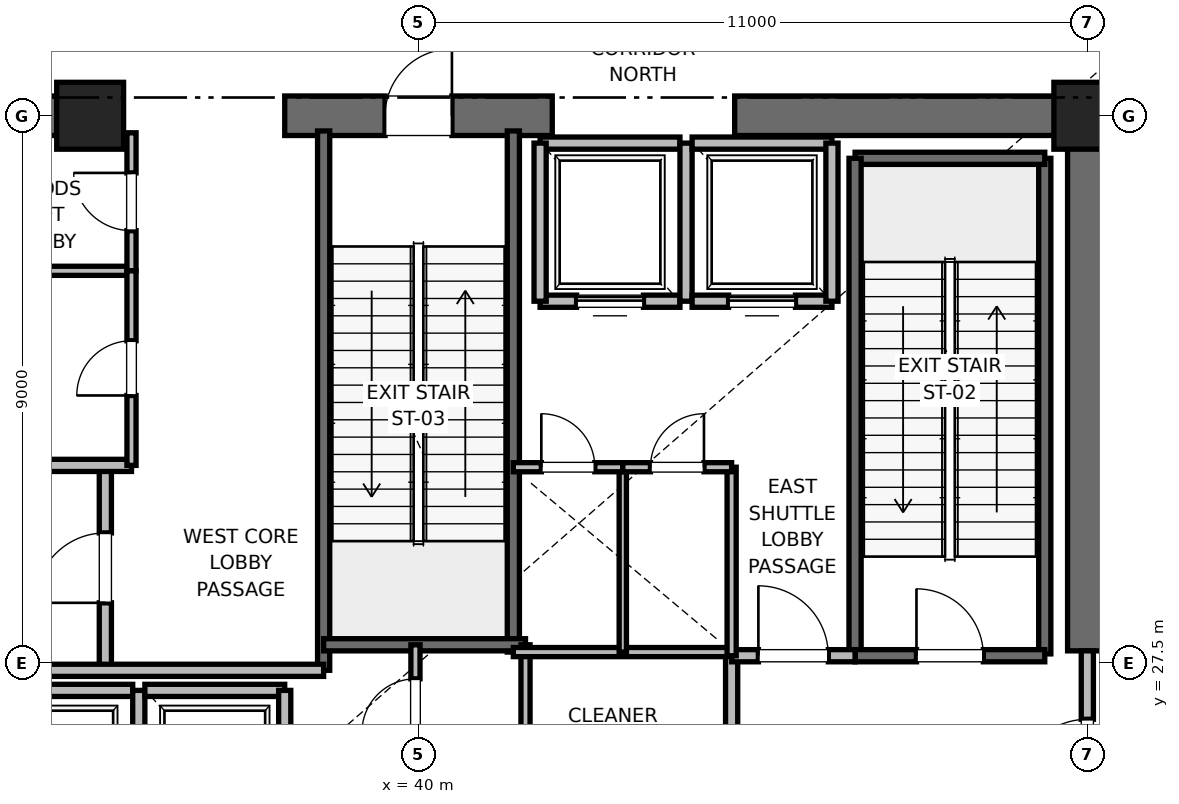
"""IFC4 building model, lengths in metres.
Left out: names, types, materials, properties, quantities, classifications, styles, units other than length and angle.
Written with IfcOpenShell. Run it as: python <this file> out.ifc"""

import sys

from ifc_helpers import new_model, si_unit, direction, frame, frame_2d, origin, origin_2d, place, context, subcontext, project, spatial, rectangle, extrude, element, fill, save


model = new_model("IFC4")
c1 = context("Model", 3, precision=1e-05, world=origin(), true_north=direction((0.0, 1.0)))
c2 = subcontext(c1, "Body", "Model", "MODEL_VIEW")
j1 = project(units=[si_unit("LENGTHUNIT", "METRE"), si_unit("PLANEANGLEUNIT", "RADIAN")], contexts=[c1])
p1 = place(None, origin())
s1 = spatial("IfcSite", under=j1, at=p1, CompositionType="ELEMENT")
p2 = place(p1, origin())
s2 = spatial("IfcBuilding", under=s1, at=p2, CompositionType="ELEMENT")
p3 = place(p2, frame((0.0, 0.0, 21.6)))
s3 = spatial("IfcBuildingStorey", under=s2, at=p3, CompositionType="ELEMENT", Elevation=21.6)
for number, where, z_axis, x_axis in (
    (1, (51.0, 36.5, 0.0), (0.0, 0.0, 1.0), (1.0, 0.0, 0.0)),
    (2, (34.6, 36.5, 0.0), (0.0, 0.0, 1.0), (1.0, 0.0, 0.0)),
):
    element("IfcColumn", number, at=place(p3, frame(where, z_axis=z_axis, x_axis=x_axis)), inside=s3, PredefinedType="PILASTER", context=c2, shape_type="SweptSolid", body=[
        extrude(rectangle(XDim=1.1, YDim=1.1, at=origin_2d()), origin(), (0.0, 0.0, 1.0), 6.0),
    ])
p4 = place(p3, frame((29.0, 36.5, 0.0), z_axis=(0.0, 0.0, 1.0), x_axis=(1.0, 0.0, 0.0)))
e3 = element("IfcWall", 3, at=p4, inside=s3, PredefinedType="SHEAR", context=c2, shape_type="SweptSolid", body=[
    extrude(rectangle(XDim=5.8, YDim=0.65, at=frame_2d((2.9, 0.0))), origin(), (0.0, 0.0, 1.0), 5.76),
])
p5 = place(p3, frame((37.8, 36.5, 0.0), z_axis=(0.0, 0.0, 1.0), x_axis=(1.0, 0.0, 0.0)))
e4 = element("IfcWall", 4, at=p5, inside=s3, PredefinedType="SHEAR", context=c2, shape_type="SweptSolid", body=[
    extrude(rectangle(XDim=4.4, YDim=0.65, at=frame_2d((2.2, 0.0))), origin(), (0.0, 0.0, 1.0), 5.76),
])
p6 = place(p5, frame((1.65, 0.0, 0.0)))
e5 = element("IfcOpeningElement", 5, at=p6, cuts=e4, PredefinedType="OPENING", context=c2, shape_type="SweptSolid", body=[
    extrude(rectangle(XDim=1.1, YDim=2.15, at=frame_2d((0.55, 1.075))), frame((0.0, 0.325, 0.0), z_axis=(0.0, -1.0, 0.0), x_axis=(1.0, 0.0, 0.0)), (0.0, 0.0, 1.0), 0.65),
])
p7 = place(p3, frame((45.2, 36.5, 0.0), z_axis=(0.0, 0.0, 1.0), x_axis=(1.0, 0.0, 0.0)))
e6 = element("IfcWall", 6, at=p7, inside=s3, PredefinedType="SHEAR", context=c2, shape_type="SweptSolid", body=[
    extrude(rectangle(XDim=5.8, YDim=0.65, at=frame_2d((2.9, 0.0))), origin(), (0.0, 0.0, 1.0), 5.76),
])
p8 = place(p3, frame((51.0, 27.7, 0.0), z_axis=(0.0, 0.0, 1.0), x_axis=(0.0, 1.0, 0.0)))
e7 = element("IfcWall", 7, at=p8, inside=s3, PredefinedType="SHEAR", context=c2, shape_type="SweptSolid", body=[
    extrude(rectangle(XDim=8.8, YDim=0.65, at=frame_2d((4.4, 0.0))), origin(), (0.0, 0.0, 1.0), 5.76),
])
p9 = place(p3, frame((50.3, 27.65, 0.0), z_axis=(0.0, 0.0, 1.0), x_axis=(0.0, 1.0, 0.0)))
e8 = element("IfcWall", 8, at=p9, inside=s3, PredefinedType="SOLIDWALL", context=c2, shape_type="SweptSolid", body=[
    extrude(rectangle(XDim=8.15, YDim=0.2, at=frame_2d((4.075, 0.0))), origin(), (0.0, 0.0, 1.0), 5.76),
])
p10 = place(p3, frame((47.18, 35.8, 0.0), z_axis=(0.0, 0.0, 1.0), x_axis=(1.0, 0.0, 0.0)))
e9 = element("IfcWall", 9, at=p10, inside=s3, PredefinedType="SOLIDWALL", context=c2, shape_type="SweptSolid", body=[
    extrude(rectangle(XDim=3.12, YDim=0.2, at=frame_2d((1.56, 0.0))), origin(), (0.0, 0.0, 1.0), 5.76),
])
p11 = place(p3, frame((47.18, 27.62, 0.0), z_axis=(0.0, 0.0, 1.0), x_axis=(0.0, 1.0, 0.0)))
e10 = element("IfcWall", 10, at=p11, inside=s3, PredefinedType="SOLIDWALL", context=c2, shape_type="SweptSolid", body=[
    extrude(rectangle(XDim=8.18, YDim=0.2, at=frame_2d((4.09, 0.0))), origin(), (0.0, 0.0, 1.0), 5.76),
])
p12 = place(p3, frame((47.18, 27.62, 0.0), z_axis=(0.0, 0.0, 1.0), x_axis=(1.0, 0.0, 0.0)))
e11 = element("IfcWall", 11, at=p12, inside=s3, PredefinedType="SOLIDWALL", context=c2, shape_type="SweptSolid", body=[
    extrude(rectangle(XDim=3.12, YDim=0.2, at=frame_2d((1.56, 0.0))), origin(), (0.0, 0.0, 1.0), 5.76),
])
p13 = place(p12, frame((1.01, 0.0, 0.0)))
e12 = element("IfcOpeningElement", 12, at=p13, cuts=e11, PredefinedType="OPENING", context=c2, shape_type="SweptSolid", body=[
    extrude(rectangle(XDim=1.1, YDim=2.15, at=frame_2d((0.55, 1.075))), frame((0.0, 0.1, 0.0), z_axis=(0.0, -1.0, 0.0), x_axis=(1.0, 0.0, 0.0)), (0.0, 0.0, 1.0), 0.2),
])
p14 = place(p3, frame((38.44, 27.38, 0.0), z_axis=(0.0, 0.0, 1.0), x_axis=(0.0, 1.0, 0.0)))
e13 = element("IfcWall", 13, at=p14, inside=s3, PredefinedType="SOLIDWALL", context=c2, shape_type="SweptSolid", body=[
    extrude(rectangle(XDim=8.87, YDim=0.2, at=frame_2d((4.435, 0.0))), origin(), (0.0, 0.0, 1.0), 5.76),
])
p15 = place(p3, frame((41.56, 27.68, 0.0), z_axis=(0.0, 0.0, 1.0), x_axis=(0.0, 1.0, 0.0)))
e14 = element("IfcWall", 14, at=p15, inside=s3, PredefinedType="SOLIDWALL", context=c2, shape_type="SweptSolid", body=[
    extrude(rectangle(XDim=8.57, YDim=0.2, at=frame_2d((4.285, 0.0))), origin(), (0.0, 0.0, 1.0), 5.76),
])
p16 = place(p3, frame((38.44, 27.8, 0.0), z_axis=(0.0, 0.0, 1.0), x_axis=(1.0, 0.0, 0.0)))
e15 = element("IfcWall", 15, at=p16, inside=s3, PredefinedType="SOLIDWALL", context=c2, shape_type="SweptSolid", body=[
    extrude(rectangle(XDim=3.32, YDim=0.2, at=frame_2d((1.66, 0.0))), origin(), (0.0, 0.0, 1.0), 5.76),
])
p17 = place(p3, frame((34.85, 27.38, 0.0), z_axis=(0.0, 0.0, 1.0), x_axis=(0.0, 1.0, 0.0)))
e16 = element("IfcWall", 16, at=p17, inside=s3, PredefinedType="PARTITIONING", context=c2, shape_type="SweptSolid", body=[
    extrude(rectangle(XDim=3.37, YDim=0.2, at=frame_2d((1.685, 0.0))), origin(), (0.0, 0.0, 1.0), 5.76),
])
p18 = place(p17, frame((1.11, 0.0, 0.0)))
e17 = element("IfcOpeningElement", 17, at=p18, cuts=e16, PredefinedType="OPENING", context=c2, shape_type="SweptSolid", body=[
    extrude(rectangle(XDim=1.15, YDim=2.2, at=frame_2d((0.575, 1.1))), frame((0.0, 0.1, 0.0), z_axis=(0.0, -1.0, 0.0), x_axis=(1.0, 0.0, 0.0)), (0.0, 0.0, 1.0), 0.2),
])
p19 = place(p3, frame((32.82, 27.38, 0.0), z_axis=(0.0, 0.0, 1.0), x_axis=(1.0, 0.0, 0.0)))
e18 = element("IfcWall", 18, at=p19, inside=s3, PredefinedType="PARTITIONING", context=c2, shape_type="SweptSolid", body=[
    extrude(rectangle(XDim=5.62, YDim=0.2, at=frame_2d((2.81, 0.0))), origin(), (0.0, 0.0, 1.0), 5.76),
])
p20 = place(p3, frame((32.15, 30.75, 0.0), z_axis=(0.0, 0.0, 1.0), x_axis=(1.0, 0.0, 0.0)))
e19 = element("IfcWall", 19, at=p20, inside=s3, PredefinedType="PARTITIONING", context=c2, shape_type="SweptSolid", body=[
    extrude(rectangle(XDim=3.13, YDim=0.2, at=frame_2d((1.565, 0.0))), origin(), (0.0, 0.0, 1.0), 5.76),
])
p21 = place(p3, frame((45.15, 24.25, 0.0), z_axis=(0.0, 0.0, 1.0), x_axis=(0.0, 1.0, 0.0)))
e20 = element("IfcWall", 20, at=p21, inside=s3, PredefinedType="PARTITIONING", context=c2, shape_type="SweptSolid", body=[
    extrude(rectangle(XDim=3.37, YDim=0.2, at=frame_2d((1.685, 0.0))), origin(), (0.0, 0.0, 1.0), 5.76),
])
p22 = place(p3, frame((45.15, 27.62, 0.0), z_axis=(0.0, 0.0, 1.0), x_axis=(1.0, 0.0, 0.0)))
e21 = element("IfcWall", 21, at=p22, inside=s3, PredefinedType="PARTITIONING", context=c2, shape_type="SweptSolid", body=[
    extrude(rectangle(XDim=2.03, YDim=0.2, at=frame_2d((1.015, 0.0))), origin(), (0.0, 0.0, 1.0), 5.76),
])
p23 = place(p22, frame((0.44, 0.0, 0.0)))
e22 = element("IfcOpeningElement", 22, at=p23, cuts=e21, PredefinedType="OPENING", context=c2, shape_type="SweptSolid", body=[
    extrude(rectangle(XDim=1.15, YDim=2.2, at=frame_2d((0.575, 1.1))), frame((0.0, 0.1, 0.0), z_axis=(0.0, -1.0, 0.0), x_axis=(1.0, 0.0, 0.0)), (0.0, 0.0, 1.0), 0.2),
])
p24 = place(p3, frame((51.0, 24.3, 0.0), z_axis=(0.0, 0.0, 1.0), x_axis=(0.0, 1.0, 0.0)))
e23 = element("IfcWall", 23, at=p24, inside=s3, PredefinedType="PARTITIONING", context=c2, shape_type="SweptSolid", body=[
    extrude(rectangle(XDim=3.4, YDim=0.2, at=frame_2d((1.7, 0.0))), origin(), (0.0, 0.0, 1.0), 4.54),
])
p25 = place(p24, frame((1.125, 0.0, 0.0)))
e24 = element("IfcOpeningElement", 24, at=p25, cuts=e23, PredefinedType="OPENING", context=c2, shape_type="SweptSolid", body=[
    extrude(rectangle(XDim=1.15, YDim=2.2, at=frame_2d((0.575, 1.1))), frame((0.0, 0.1, 0.0), z_axis=(0.0, -1.0, 0.0), x_axis=(1.0, 0.0, 0.0)), (0.0, 0.0, 1.0), 0.2),
])
p26 = place(p3, frame((35.3, 27.05, 0.0), z_axis=(0.0, 0.0, 1.0), x_axis=(-1.0, 0.0, 0.0)))
e25 = element("IfcWall", 25, at=p26, inside=s3, PredefinedType="SOLIDWALL", context=c2, shape_type="SweptSolid", body=[
    extrude(rectangle(XDim=2.3, YDim=0.2, at=frame_2d((1.15, 0.0))), origin(), (0.0, 0.0, 1.0), 5.76),
])
p27 = place(p3, frame((35.4, 24.45, 0.0), z_axis=(0.0, 0.0, 1.0), x_axis=(0.0, 1.0, 0.0)))
e26 = element("IfcWall", 26, at=p27, inside=s3, PredefinedType="SOLIDWALL", context=c2, shape_type="SweptSolid", body=[
    extrude(rectangle(XDim=2.6, YDim=0.2, at=frame_2d((1.3, 0.0))), origin(), (0.0, 0.0, 1.0), 5.76),
])
p28 = place(p3, frame((37.8, 27.05, 0.0), z_axis=(0.0, 0.0, 1.0), x_axis=(-1.0, 0.0, 0.0)))
e27 = element("IfcWall", 27, at=p28, inside=s3, PredefinedType="SOLIDWALL", context=c2, shape_type="SweptSolid", body=[
    extrude(rectangle(XDim=2.3, YDim=0.2, at=frame_2d((1.15, 0.0))), origin(), (0.0, 0.0, 1.0), 5.76),
])
p29 = place(p3, frame((37.8, 24.45, 0.0), z_axis=(0.0, 0.0, 1.0), x_axis=(0.0, 1.0, 0.0)))
e28 = element("IfcWall", 28, at=p29, inside=s3, PredefinedType="SOLIDWALL", context=c2, shape_type="SweptSolid", body=[
    extrude(rectangle(XDim=2.6, YDim=0.2, at=frame_2d((1.3, 0.0))), origin(), (0.0, 0.0, 1.0), 5.76),
])
p30 = place(p3, frame((42.0, 33.45, 0.0), z_axis=(0.0, 0.0, 1.0), x_axis=(1.0, 0.0, 0.0)))
e29 = element("IfcWall", 29, at=p30, inside=s3, PredefinedType="SOLIDWALL", context=c2, shape_type="SweptSolid", body=[
    extrude(rectangle(XDim=2.3, YDim=0.2, at=frame_2d((1.15, 0.0))), origin(), (0.0, 0.0, 1.0), 5.76),
])
p31 = place(p30, frame((0.6, 0.0, 0.0)))
e30 = element("IfcOpeningElement", 30, at=p31, cuts=e29, PredefinedType="OPENING", context=c2, shape_type="SweptSolid", body=[
    extrude(rectangle(XDim=1.1, YDim=2.2, at=frame_2d((0.55, 1.1))), frame((0.0, 0.1, 0.0), z_axis=(0.0, -1.0, 0.0), x_axis=(1.0, 0.0, 0.0)), (0.0, 0.0, 1.0), 0.2),
])
p32 = place(p3, frame((44.3, 36.05, 0.0), z_axis=(0.0, 0.0, 1.0), x_axis=(-1.0, 0.0, 0.0)))
e31 = element("IfcWall", 31, at=p32, inside=s3, PredefinedType="SOLIDWALL", context=c2, shape_type="SweptSolid", body=[
    extrude(rectangle(XDim=2.3, YDim=0.2, at=frame_2d((1.15, 0.0))), origin(), (0.0, 0.0, 1.0), 4.54),
])
for number, where, z_axis, x_axis in (
    (32, (42.0, 36.05, 0.0), (0.0, 0.0, 1.0), (0.0, -1.0, 0.0)),
    (33, (44.4, 33.45, 0.0), (0.0, 0.0, 1.0), (0.0, 1.0, 0.0)),
):
    element("IfcWall", number, at=place(p3, frame(where, z_axis=z_axis, x_axis=x_axis)), inside=s3, PredefinedType="SOLIDWALL", context=c2, shape_type="SweptSolid", body=[
        extrude(rectangle(XDim=2.6, YDim=0.2, at=frame_2d((1.3, 0.0))), origin(), (0.0, 0.0, 1.0), 4.54),
    ])
p33 = place(p3, frame((44.5, 33.45, 0.0), z_axis=(0.0, 0.0, 1.0), x_axis=(1.0, 0.0, 0.0)))
e34 = element("IfcWall", 34, at=p33, inside=s3, PredefinedType="SOLIDWALL", context=c2, shape_type="SweptSolid", body=[
    extrude(rectangle(XDim=2.3, YDim=0.2, at=frame_2d((1.15, 0.0))), origin(), (0.0, 0.0, 1.0), 5.76),
])
p34 = place(p33, frame((0.6, 0.0, 0.0)))
e35 = element("IfcOpeningElement", 35, at=p34, cuts=e34, PredefinedType="OPENING", context=c2, shape_type="SweptSolid", body=[
    extrude(rectangle(XDim=1.1, YDim=2.2, at=frame_2d((0.55, 1.1))), frame((0.0, 0.1, 0.0), z_axis=(0.0, -1.0, 0.0), x_axis=(1.0, 0.0, 0.0)), (0.0, 0.0, 1.0), 0.2),
])
p35 = place(p3, frame((46.8, 36.05, 0.0), z_axis=(0.0, 0.0, 1.0), x_axis=(-1.0, 0.0, 0.0)))
e36 = element("IfcWall", 36, at=p35, inside=s3, PredefinedType="SOLIDWALL", context=c2, shape_type="SweptSolid", body=[
    extrude(rectangle(XDim=2.3, YDim=0.2, at=frame_2d((1.15, 0.0))), origin(), (0.0, 0.0, 1.0), 4.54),
])
p36 = place(p3, frame((46.8, 33.45, 0.0), z_axis=(0.0, 0.0, 1.0), x_axis=(0.0, 1.0, 0.0)))
e37 = element("IfcWall", 37, at=p36, inside=s3, PredefinedType="SOLIDWALL", context=c2, shape_type="SweptSolid", body=[
    extrude(rectangle(XDim=2.6, YDim=0.2, at=frame_2d((1.3, 0.0))), origin(), (0.0, 0.0, 1.0), 5.76),
])
p37 = place(p3, frame((41.76, 23.8, 0.0), z_axis=(0.0, 0.0, 1.0), x_axis=(0.0, 1.0, 0.0)))
e38 = element("IfcWall", 38, at=p37, inside=s3, PredefinedType="PARTITIONING", context=c2, shape_type="SweptSolid", body=[
    extrude(rectangle(XDim=4.0, YDim=0.15, at=frame_2d((2.0, 0.0))), origin(), (0.0, 0.0, 1.0), 2.85),
])
p38 = place(p3, frame((39.95, 25.8, 0.0), z_axis=(0.0, 0.0, 1.0), x_axis=(0.0, 1.0, 0.0)))
e39 = element("IfcWall", 39, at=p38, inside=s3, PredefinedType="PARTITIONING", context=c2, shape_type="SweptSolid", body=[
    extrude(rectangle(XDim=2.0, YDim=0.15, at=frame_2d((1.0, 0.0))), origin(), (0.0, 0.0, 1.0), 2.85),
])
p39 = place(p38, frame((0.56, 0.0, 0.0)))
e40 = element("IfcOpeningElement", 40, at=p39, cuts=e39, PredefinedType="OPENING", context=c2, shape_type="SweptSolid", body=[
    extrude(rectangle(XDim=0.88, YDim=2.1, at=frame_2d((0.44, 1.05))), frame((0.0, 0.075, 0.0), z_axis=(0.0, -1.0, 0.0), x_axis=(1.0, 0.0, 0.0)), (0.0, 0.0, 1.0), 0.15),
])
p40 = place(p3, frame((32.15, 33.95, 0.0), z_axis=(0.0, 0.0, 1.0), x_axis=(1.0, 0.0, 0.0)))
e41 = element("IfcWall", 41, at=p40, inside=s3, PredefinedType="PARTITIONING", context=c2, shape_type="SweptSolid", body=[
    extrude(rectangle(XDim=3.13, YDim=0.15, at=frame_2d((1.565, 0.0))), origin(), (0.0, 0.0, 1.0), 2.85),
])
p41 = place(p3, frame((35.28, 33.95, 0.0), z_axis=(0.0, 0.0, 1.0), x_axis=(0.0, 1.0, 0.0)))
e42 = element("IfcWall", 42, at=p41, inside=s3, PredefinedType="PARTITIONING", context=c2, shape_type="SweptSolid", body=[
    extrude(rectangle(XDim=2.27, YDim=0.15, at=frame_2d((1.135, 0.0))), origin(), (0.0, 0.0, 1.0), 2.85),
])
p42 = place(p41, frame((0.66, 0.0, 0.0)))
e43 = element("IfcOpeningElement", 43, at=p42, cuts=e42, PredefinedType="OPENING", context=c2, shape_type="SweptSolid", body=[
    extrude(rectangle(XDim=0.95, YDim=2.15, at=frame_2d((0.475, 1.075))), frame((0.0, 0.075, 0.0), z_axis=(0.0, -1.0, 0.0), x_axis=(1.0, 0.0, 0.0)), (0.0, 0.0, 1.0), 0.15),
])
p43 = place(p3, frame((35.28, 30.75, 0.0), z_axis=(0.0, 0.0, 1.0), x_axis=(0.0, 1.0, 0.0)))
e44 = element("IfcWall", 44, at=p43, inside=s3, PredefinedType="PARTITIONING", context=c2, shape_type="SweptSolid", body=[
    extrude(rectangle(XDim=3.2, YDim=0.15, at=frame_2d((1.6, 0.0))), origin(), (0.0, 0.0, 1.0), 2.85),
])
p44 = place(p43, frame((1.15, 0.0, 0.0)))
e45 = element("IfcOpeningElement", 45, at=p44, cuts=e44, PredefinedType="OPENING", context=c2, shape_type="SweptSolid", body=[
    extrude(rectangle(XDim=0.9, YDim=2.1, at=frame_2d((0.45, 1.05))), frame((0.0, 0.075, 0.0), z_axis=(0.0, -1.0, 0.0), x_axis=(1.0, 0.0, 0.0)), (0.0, 0.0, 1.0), 0.15),
])
p45 = place(p3, frame((41.56, 27.68, 0.0), z_axis=(0.0, 0.0, 1.0), x_axis=(1.0, 0.0, 0.0)))
e46 = element("IfcWall", 46, at=p45, inside=s3, PredefinedType="PARTITIONING", context=c2, shape_type="SweptSolid", body=[
    extrude(rectangle(XDim=3.59, YDim=0.15, at=frame_2d((1.795, 0.0))), origin(), (0.0, 0.0, 1.0), 2.85),
])
p46 = place(p3, frame((45.15, 27.62, 0.0), z_axis=(0.0, 0.0, 1.0), x_axis=(0.0, 1.0, 0.0)))
e47 = element("IfcWall", 47, at=p46, inside=s3, PredefinedType="PARTITIONING", context=c2, shape_type="SweptSolid", body=[
    extrude(rectangle(XDim=3.1, YDim=0.15, at=frame_2d((1.55, 0.0))), origin(), (0.0, 0.0, 1.0), 2.85),
])
p47 = place(p3, frame((43.36, 27.68, 0.0), z_axis=(0.0, 0.0, 1.0), x_axis=(0.0, 1.0, 0.0)))
e48 = element("IfcWall", 48, at=p47, inside=s3, PredefinedType="PARTITIONING", context=c2, shape_type="SweptSolid", body=[
    extrude(rectangle(XDim=3.04, YDim=0.12, at=frame_2d((1.52, 0.0))), origin(), (0.0, 0.0, 1.0), 2.85),
])
p48 = place(p3, frame((41.56, 30.72, 0.0), z_axis=(0.0, 0.0, 1.0), x_axis=(1.0, 0.0, 0.0)))
e49 = element("IfcWall", 49, at=p48, inside=s3, PredefinedType="PARTITIONING", context=c2, shape_type="SweptSolid", body=[
    extrude(rectangle(XDim=1.8, YDim=0.15, at=frame_2d((0.9, 0.0))), origin(), (0.0, 0.0, 1.0), 2.85),
])
p49 = place(p48, frame((0.46, 0.0, 0.0)))
e50 = element("IfcOpeningElement", 50, at=p49, cuts=e49, PredefinedType="OPENING", context=c2, shape_type="SweptSolid", body=[
    extrude(rectangle(XDim=0.88, YDim=2.1, at=frame_2d((0.44, 1.05))), frame((0.0, 0.075, 0.0), z_axis=(0.0, -1.0, 0.0), x_axis=(1.0, 0.0, 0.0)), (0.0, 0.0, 1.0), 0.15),
])
p50 = place(p3, frame((43.36, 30.72, 0.0), z_axis=(0.0, 0.0, 1.0), x_axis=(1.0, 0.0, 0.0)))
e51 = element("IfcWall", 51, at=p50, inside=s3, PredefinedType="PARTITIONING", context=c2, shape_type="SweptSolid", body=[
    extrude(rectangle(XDim=1.79, YDim=0.15, at=frame_2d((0.895, 0.0))), origin(), (0.0, 0.0, 1.0), 2.85),
])
p51 = place(p50, frame((0.455, 0.0, 0.0)))
e52 = element("IfcOpeningElement", 52, at=p51, cuts=e51, PredefinedType="OPENING", context=c2, shape_type="SweptSolid", body=[
    extrude(rectangle(XDim=0.88, YDim=2.1, at=frame_2d((0.44, 1.05))), frame((0.0, 0.075, 0.0), z_axis=(0.0, -1.0, 0.0), x_axis=(1.0, 0.0, 0.0)), (0.0, 0.0, 1.0), 0.15),
])
p52 = place(p13, origin())
e53 = element("IfcDoor", 53, at=p52, inside=s3, OperationType="SINGLE_SWING_LEFT", PredefinedType="DOOR", context=c2, shape_type="SweptSolid", body=[
    extrude(rectangle(XDim=1.1, YDim=2.15, at=frame_2d((0.55, 1.075))), frame((0.0, 0.025, 0.0), z_axis=(0.0, -1.0, 0.0), x_axis=(1.0, 0.0, 0.0)), (0.0, 0.0, 1.0), 0.05),
])
fill(e12, e53)
p53 = place(p6, origin())
e54 = element("IfcDoor", 54, at=p53, inside=s3, OperationType="SINGLE_SWING_RIGHT", PredefinedType="DOOR", context=c2, shape_type="SweptSolid", body=[
    extrude(rectangle(XDim=1.1, YDim=2.15, at=frame_2d((0.55, 1.075))), frame((0.0, 0.025, 0.0), z_axis=(0.0, -1.0, 0.0), x_axis=(1.0, 0.0, 0.0)), (0.0, 0.0, 1.0), 0.05),
])
fill(e5, e54)
p54 = place(p18, origin())
e55 = element("IfcDoor", 55, at=p54, inside=s3, OperationType="SINGLE_SWING_LEFT", PredefinedType="DOOR", context=c2, shape_type="SweptSolid", body=[
    extrude(rectangle(XDim=1.15, YDim=2.2, at=frame_2d((0.575, 1.1))), frame((0.0, 0.025, 0.0), z_axis=(0.0, -1.0, 0.0), x_axis=(1.0, 0.0, 0.0)), (0.0, 0.0, 1.0), 0.05),
])
fill(e17, e55)
p55 = place(p23, origin())
e56 = element("IfcDoor", 56, at=p55, inside=s3, OperationType="SINGLE_SWING_LEFT", PredefinedType="DOOR", context=c2, shape_type="SweptSolid", body=[
    extrude(rectangle(XDim=1.15, YDim=2.2, at=frame_2d((0.575, 1.1))), frame((0.0, 0.025, 0.0), z_axis=(0.0, -1.0, 0.0), x_axis=(1.0, 0.0, 0.0)), (0.0, 0.0, 1.0), 0.05),
])
fill(e22, e56)
p56 = place(p25, origin())
e57 = element("IfcDoor", 57, at=p56, inside=s3, OperationType="SINGLE_SWING_LEFT", PredefinedType="DOOR", context=c2, shape_type="SweptSolid", body=[
    extrude(rectangle(XDim=1.15, YDim=2.2, at=frame_2d((0.575, 1.1))), frame((0.0, 0.025, 0.0), z_axis=(0.0, -1.0, 0.0), x_axis=(1.0, 0.0, 0.0)), (0.0, 0.0, 1.0), 0.05),
])
fill(e24, e57)
p57 = place(p31, origin())
e58 = element("IfcDoor", 58, at=p57, inside=s3, OperationType="SLIDING_TO_RIGHT", PredefinedType="DOOR", context=c2, shape_type="SweptSolid", body=[
    extrude(rectangle(XDim=1.1, YDim=2.2, at=frame_2d((0.55, 1.1))), frame((0.0, 0.025, 0.0), z_axis=(0.0, -1.0, 0.0), x_axis=(1.0, 0.0, 0.0)), (0.0, 0.0, 1.0), 0.05),
])
fill(e30, e58)
p58 = place(p34, origin())
e59 = element("IfcDoor", 59, at=p58, inside=s3, OperationType="SLIDING_TO_RIGHT", PredefinedType="DOOR", context=c2, shape_type="SweptSolid", body=[
    extrude(rectangle(XDim=1.1, YDim=2.2, at=frame_2d((0.55, 1.1))), frame((0.0, 0.025, 0.0), z_axis=(0.0, -1.0, 0.0), x_axis=(1.0, 0.0, 0.0)), (0.0, 0.0, 1.0), 0.05),
])
fill(e35, e59)
p59 = place(p39, origin())
e60 = element("IfcDoor", 60, at=p59, inside=s3, OperationType="SINGLE_SWING_LEFT", PredefinedType="DOOR", context=c2, shape_type="SweptSolid", body=[
    extrude(rectangle(XDim=0.88, YDim=2.1, at=frame_2d((0.44, 1.05))), frame((0.0, 0.025, 0.0), z_axis=(0.0, -1.0, 0.0), x_axis=(1.0, 0.0, 0.0)), (0.0, 0.0, 1.0), 0.05),
])
fill(e40, e60)
p60 = place(p42, origin())
e61 = element("IfcDoor", 61, at=p60, inside=s3, OperationType="SINGLE_SWING_RIGHT", PredefinedType="DOOR", context=c2, shape_type="SweptSolid", body=[
    extrude(rectangle(XDim=0.95, YDim=2.15, at=frame_2d((0.475, 1.075))), frame((0.0, 0.025, 0.0), z_axis=(0.0, -1.0, 0.0), x_axis=(1.0, 0.0, 0.0)), (0.0, 0.0, 1.0), 0.05),
])
fill(e43, e61)
p61 = place(p44, origin())
e62 = element("IfcDoor", 62, at=p61, inside=s3, OperationType="SINGLE_SWING_LEFT", PredefinedType="DOOR", context=c2, shape_type="SweptSolid", body=[
    extrude(rectangle(XDim=0.9, YDim=2.1, at=frame_2d((0.45, 1.05))), frame((0.0, 0.025, 0.0), z_axis=(0.0, -1.0, 0.0), x_axis=(1.0, 0.0, 0.0)), (0.0, 0.0, 1.0), 0.05),
])
fill(e45, e62)
p62 = place(p49, origin())
e63 = element("IfcDoor", 63, at=p62, inside=s3, OperationType="SINGLE_SWING_LEFT", PredefinedType="DOOR", context=c2, shape_type="SweptSolid", body=[
    extrude(rectangle(XDim=0.88, YDim=2.1, at=frame_2d((0.44, 1.05))), frame((0.0, 0.025, 0.0), z_axis=(0.0, -1.0, 0.0), x_axis=(1.0, 0.0, 0.0)), (0.0, 0.0, 1.0), 0.05),
])
fill(e50, e63)
p63 = place(p51, origin())
e64 = element("IfcDoor", 64, at=p63, inside=s3, OperationType="SINGLE_SWING_RIGHT", PredefinedType="DOOR", context=c2, shape_type="SweptSolid", body=[
    extrude(rectangle(XDim=0.88, YDim=2.1, at=frame_2d((0.44, 1.05))), frame((0.0, 0.025, 0.0), z_axis=(0.0, -1.0, 0.0), x_axis=(1.0, 0.0, 0.0)), (0.0, 0.0, 1.0), 0.05),
])
fill(e52, e64)
save(model, sys.argv[1])
